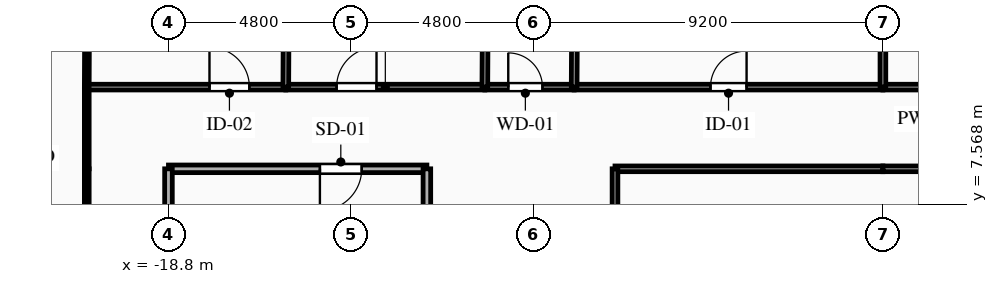
"""IFC4 building model, lengths in metres.
Left out: names, types, materials, properties, quantities, classifications, styles, units other than length and angle.
Written with IfcOpenShell. Run it as: python <this file> out.ifc"""

import sys

from ifc_helpers import new_model, si_unit, direction, frame, frame_2d, origin, place, context, subcontext, project, spatial, rectangle, extrude, element, fill, save


model = new_model("IFC4")
c1 = context("Model", 3, precision=1e-05, world=origin(), true_north=direction((0.0, 1.0)))
c2 = subcontext(c1, "Body", "Model", "MODEL_VIEW")
j1 = project(units=[si_unit("LENGTHUNIT", "METRE"), si_unit("PLANEANGLEUNIT", "RADIAN")], contexts=[c1])
p1 = place(None, origin())
s1 = spatial("IfcSite", under=j1, at=p1, CompositionType="ELEMENT")
p2 = place(p1, origin())
s2 = spatial("IfcBuilding", under=s1, at=p2, CompositionType="ELEMENT")
p3 = place(p2, frame((0.0, 0.0, 203.1)))
s3 = spatial("IfcBuildingStorey", under=s2, at=p3, CompositionType="ELEMENT", Elevation=203.1)
p4 = place(p3, frame((-12.0, 8.5, 0.0), z_axis=(0.0, 0.0, 1.0), x_axis=(-1.0, 0.0, 0.0)))
e1 = element("IfcWall", 1, at=p4, inside=s3, PredefinedType="PARTITIONING", context=c2, shape_type="SweptSolid", body=[
    extrude(rectangle(XDim=6.8, YDim=0.2, at=frame_2d((3.4, 0.0))), origin(), (0.0, 0.0, 1.0), 3.04),
])
p5 = place(p4, frame((1.715, 0.0, 0.0)))
e2 = element("IfcOpeningElement", 2, at=p5, cuts=e1, PredefinedType="OPENING", context=c2, shape_type="SweptSolid", body=[
    extrude(rectangle(XDim=1.1, YDim=2.15, at=frame_2d((0.55, 1.075))), frame((0.0, 0.11, 0.0), z_axis=(0.0, -1.0, 0.0), x_axis=(1.0, 0.0, 0.0)), (0.0, 0.0, 1.0), 0.22),
])
p6 = place(p3, frame((-18.8, 8.5, 0.0), z_axis=(0.0, 0.0, 1.0), x_axis=(0.0, -1.0, 0.0)))
e3 = element("IfcWall", 3, at=p6, inside=s3, PredefinedType="PARTITIONING", context=c2, shape_type="SweptSolid", body=[
    extrude(rectangle(XDim=2.9, YDim=0.2, at=frame_2d((1.45, 0.0))), origin(), (0.0, 0.0, 1.0), 2.665),
])
p7 = place(p3, frame((-12.0, 5.6, 0.0), z_axis=(0.0, 0.0, 1.0), x_axis=(0.0, 1.0, 0.0)))
e4 = element("IfcWall", 4, at=p7, inside=s3, PredefinedType="PARTITIONING", context=c2, shape_type="SweptSolid", body=[
    extrude(rectangle(XDim=2.9, YDim=0.2, at=frame_2d((1.45, 0.0))), origin(), (0.0, 0.0, 1.0), 3.04),
])
p8 = place(p3, frame((-20.95, 8.5, 0.0), z_axis=(0.0, 0.0, 1.0), x_axis=(0.0, 1.0, 0.0)))
e5 = element("IfcWall", 5, at=p8, inside=s3, PredefinedType="PARTITIONING", context=c2, shape_type="SweptSolid", body=[
    extrude(rectangle(XDim=2.15, YDim=0.125, at=frame_2d((1.075, 0.0))), origin(), (0.0, 0.0, 1.0), 3.04),
])
p9 = place(p3, frame((-20.95, 10.65, 0.0), z_axis=(0.0, 0.0, 1.0), x_axis=(1.0, 0.0, 0.0)))
e6 = element("IfcWall", 6, at=p9, inside=s3, PredefinedType="PARTITIONING", context=c2, shape_type="SweptSolid", body=[
    extrude(rectangle(XDim=5.238, YDim=0.15, at=frame_2d((2.619, 0.0))), origin(), (0.0, 0.0, 1.0), 3.04),
])
p10 = place(p9, frame((3.229, 0.0, 0.0)))
e7 = element("IfcOpeningElement", 7, at=p10, cuts=e6, PredefinedType="OPENING", context=c2, shape_type="SweptSolid", body=[
    extrude(rectangle(XDim=1.05, YDim=2.15, at=frame_2d((0.525, 1.075))), frame((0.0, 0.085, 0.0), z_axis=(0.0, -1.0, 0.0), x_axis=(1.0, 0.0, 0.0)), (0.0, 0.0, 1.0), 0.17),
])
p11 = place(p3, frame((-15.712, 10.65, 0.0), z_axis=(0.0, 0.0, 1.0), x_axis=(1.0, 0.0, 0.0)))
e8 = element("IfcWall", 8, at=p11, inside=s3, PredefinedType="PARTITIONING", context=c2, shape_type="SweptSolid", body=[
    extrude(rectangle(XDim=5.237, YDim=0.15, at=frame_2d((2.619, 0.0))), origin(), (0.0, 0.0, 1.0), 3.04),
])
p12 = place(p11, frame((1.337, 0.0, 0.0)))
e9 = element("IfcOpeningElement", 9, at=p12, cuts=e8, PredefinedType="OPENING", context=c2, shape_type="SweptSolid", body=[
    extrude(rectangle(XDim=1.05, YDim=2.15, at=frame_2d((0.525, 1.075))), frame((0.0, 0.085, 0.0), z_axis=(0.0, -1.0, 0.0), x_axis=(1.0, 0.0, 0.0)), (0.0, 0.0, 1.0), 0.17),
])
p13 = place(p3, frame((-10.475, 10.65, 0.0), z_axis=(0.0, 0.0, 1.0), x_axis=(1.0, 0.0, 0.0)))
e10 = element("IfcWall", 10, at=p13, inside=s3, PredefinedType="PLUMBINGWALL", context=c2, shape_type="SweptSolid", body=[
    extrude(rectangle(XDim=2.35, YDim=0.15, at=frame_2d((1.175, 0.0))), origin(), (0.0, 0.0, 1.0), 3.04),
])
p14 = place(p13, frame((0.616, 0.0, 0.0)))
e11 = element("IfcOpeningElement", 11, at=p14, cuts=e10, PredefinedType="OPENING", context=c2, shape_type="SweptSolid", body=[
    extrude(rectangle(XDim=0.9, YDim=2.1, at=frame_2d((0.45, 1.05))), frame((0.0, 0.085, 0.0), z_axis=(0.0, -1.0, 0.0), x_axis=(1.0, 0.0, 0.0)), (0.0, 0.0, 1.0), 0.17),
])
p15 = place(p3, frame((-8.125, 10.65, 0.0), z_axis=(0.0, 0.0, 1.0), x_axis=(1.0, 0.0, 0.0)))
e12 = element("IfcWall", 12, at=p15, inside=s3, PredefinedType="PARTITIONING", context=c2, shape_type="SweptSolid", body=[
    extrude(rectangle(XDim=8.125, YDim=0.15, at=frame_2d((4.062, 0.0))), origin(), (0.0, 0.0, 1.0), 3.04),
])
p16 = place(p15, frame((3.587, 0.0, 0.0)))
e13 = element("IfcOpeningElement", 13, at=p16, cuts=e12, PredefinedType="OPENING", context=c2, shape_type="SweptSolid", body=[
    extrude(rectangle(XDim=0.95, YDim=2.1, at=frame_2d((0.475, 1.05))), frame((0.0, 0.085, 0.0), z_axis=(0.0, -1.0, 0.0), x_axis=(1.0, 0.0, 0.0)), (0.0, 0.0, 1.0), 0.17),
])
p17 = place(p3, frame((0.0, 8.5, 0.0), z_axis=(0.0, 0.0, 1.0), x_axis=(-1.0, 0.0, 0.0)))
e14 = element("IfcWall", 14, at=p17, inside=s3, PredefinedType="PARTITIONING", context=c2, shape_type="SweptSolid", body=[
    extrude(rectangle(XDim=7.05, YDim=0.15, at=frame_2d((3.525, 0.0))), origin(), (0.0, 0.0, 1.0), 3.04),
])
p18 = place(p3, frame((0.0, 10.65, 0.0), z_axis=(0.0, 0.0, 1.0), x_axis=(1.0, 0.0, 0.0)))
e15 = element("IfcWall", 15, at=p18, inside=s3, PredefinedType="PLUMBINGWALL", context=c2, shape_type="SweptSolid", body=[
    extrude(rectangle(XDim=2.45, YDim=0.15, at=frame_2d((1.225, 0.0))), origin(), (0.0, 0.0, 1.0), 3.04),
])
p19 = place(p3, frame((7.05, 8.5, 0.0), z_axis=(0.0, 0.0, 1.0), x_axis=(-1.0, 0.0, 0.0)))
e16 = element("IfcWall", 16, at=p19, inside=s3, PredefinedType="PARTITIONING", context=c2, shape_type="SweptSolid", body=[
    extrude(rectangle(XDim=7.05, YDim=0.15, at=frame_2d((3.525, 0.0))), origin(), (0.0, 0.0, 1.0), 3.04),
])
p20 = place(p3, frame((-20.95, 2.267, 0.0), z_axis=(0.0, 0.0, 1.0), x_axis=(0.0, 1.0, 0.0)))
e17 = element("IfcWall", 17, at=p20, inside=s3, PredefinedType="PARTITIONING", context=c2, shape_type="SweptSolid", body=[
    extrude(rectangle(XDim=6.233, YDim=0.125, at=frame_2d((3.116, 0.0))), origin(), (0.0, 0.0, 1.0), 3.04),
])
p21 = place(p20, frame((1.095, 0.0, 0.0)))
e18 = element("IfcOpeningElement", 18, at=p21, cuts=e17, PredefinedType="OPENING", context=c2, shape_type="SweptSolid", body=[
    extrude(rectangle(XDim=0.95, YDim=2.1, at=frame_2d((0.475, 1.05))), frame((0.0, 0.073, 0.0), z_axis=(0.0, -1.0, 0.0), x_axis=(1.0, 0.0, 0.0)), (0.0, 0.0, 1.0), 0.145),
])
p22 = place(p3, frame((-7.05, 8.5, 0.0), z_axis=(0.0, 0.0, 1.0), x_axis=(0.0, -1.0, 0.0)))
e19 = element("IfcWall", 19, at=p22, inside=s3, PredefinedType="PARTITIONING", context=c2, shape_type="SweptSolid", body=[
    extrude(rectangle(XDim=9.3, YDim=0.15, at=frame_2d((4.65, 0.0))), origin(), (0.0, 0.0, 1.0), 3.04),
])
p23 = place(p3, frame((-20.906, 19.662, 0.0), z_axis=(0.0, 0.0, 1.0), x_axis=(-0.004876272857, -0.999988110911, 0.0)))
e20 = element("IfcWall", 20, at=p23, inside=s3, PredefinedType="PARTITIONING", context=c2, shape_type="SweptSolid", body=[
    extrude(rectangle(XDim=9.012, YDim=0.125, at=frame_2d((4.506, 0.0))), origin(), (0.0, 0.0, 1.0), 2.665),
])
p24 = place(p3, frame((-15.669, 19.112, 0.0), z_axis=(0.0, 0.0, 1.0), x_axis=(-0.005164534834, -0.999986663701, 0.0)))
e21 = element("IfcWall", 21, at=p24, inside=s3, PredefinedType="PARTITIONING", context=c2, shape_type="SweptSolid", body=[
    extrude(rectangle(XDim=8.462, YDim=0.15, at=frame_2d((4.231, 0.0))), origin(), (0.0, 0.0, 1.0), 2.665),
])
p25 = place(p3, frame((-10.431, 18.561, 0.0), z_axis=(0.0, 0.0, 1.0), x_axis=(-0.005554784069, -0.999984572068, 0.0)))
e22 = element("IfcWall", 22, at=p25, inside=s3, PredefinedType="PLUMBINGWALL", context=c2, shape_type="SweptSolid", body=[
    extrude(rectangle(XDim=7.911, YDim=0.15, at=frame_2d((3.956, 0.0))), origin(), (0.0, 0.0, 1.0), 3.04),
])
p26 = place(p3, frame((-8.081, 18.314, 0.0), z_axis=(0.0, 0.0, 1.0), x_axis=(-0.005733850696, -0.999983561343, 0.0)))
e23 = element("IfcWall", 23, at=p26, inside=s3, PredefinedType="PLUMBINGWALL", context=c2, shape_type="SweptSolid", body=[
    extrude(rectangle(XDim=7.664, YDim=0.15, at=frame_2d((3.832, 0.0))), origin(), (0.0, 0.0, 1.0), 2.665),
])
p27 = place(p3, frame((0.0, 12.8, 0.0), z_axis=(0.0, 0.0, 1.0), x_axis=(0.0, -1.0, 0.0)))
e24 = element("IfcWall", 24, at=p27, inside=s3, PredefinedType="PLUMBINGWALL", context=c2, shape_type="SweptSolid", body=[
    extrude(rectangle(XDim=2.15, YDim=0.15, at=frame_2d((1.075, 0.0))), origin(), (0.0, 0.0, 1.0), 3.04),
])
p28 = place(p5, origin())
e25 = element("IfcDoor", 25, at=p28, inside=s3, OperationType="SINGLE_SWING_RIGHT", PredefinedType="DOOR", context=c2, shape_type="SweptSolid", body=[
    extrude(rectangle(XDim=1.1, YDim=2.15, at=frame_2d((0.55, 1.075))), frame((0.0, 0.025, 0.0), z_axis=(0.0, -1.0, 0.0), x_axis=(1.0, 0.0, 0.0)), (0.0, 0.0, 1.0), 0.05),
])
fill(e2, e25)
p29 = place(p10, origin())
e26 = element("IfcDoor", 26, at=p29, inside=s3, OperationType="SINGLE_SWING_LEFT", PredefinedType="DOOR", context=c2, shape_type="SweptSolid", body=[
    extrude(rectangle(XDim=1.05, YDim=2.15, at=frame_2d((0.525, 1.075))), frame((0.0, 0.025, 0.0), z_axis=(0.0, -1.0, 0.0), x_axis=(1.0, 0.0, 0.0)), (0.0, 0.0, 1.0), 0.05),
])
fill(e7, e26)
p30 = place(p12, origin())
e27 = element("IfcDoor", 27, at=p30, inside=s3, OperationType="SINGLE_SWING_RIGHT", PredefinedType="DOOR", context=c2, shape_type="SweptSolid", body=[
    extrude(rectangle(XDim=1.05, YDim=2.15, at=frame_2d((0.525, 1.075))), frame((0.0, 0.025, 0.0), z_axis=(0.0, -1.0, 0.0), x_axis=(1.0, 0.0, 0.0)), (0.0, 0.0, 1.0), 0.05),
])
fill(e9, e27)
p31 = place(p14, origin())
e28 = element("IfcDoor", 28, at=p31, inside=s3, OperationType="SINGLE_SWING_LEFT", PredefinedType="DOOR", context=c2, shape_type="SweptSolid", body=[
    extrude(rectangle(XDim=0.9, YDim=2.1, at=frame_2d((0.45, 1.05))), frame((0.0, 0.025, 0.0), z_axis=(0.0, -1.0, 0.0), x_axis=(1.0, 0.0, 0.0)), (0.0, 0.0, 1.0), 0.05),
])
fill(e11, e28)
p32 = place(p16, origin())
e29 = element("IfcDoor", 29, at=p32, inside=s3, OperationType="SINGLE_SWING_RIGHT", PredefinedType="DOOR", context=c2, shape_type="SweptSolid", body=[
    extrude(rectangle(XDim=0.95, YDim=2.1, at=frame_2d((0.475, 1.05))), frame((0.0, 0.025, 0.0), z_axis=(0.0, -1.0, 0.0), x_axis=(1.0, 0.0, 0.0)), (0.0, 0.0, 1.0), 0.05),
])
fill(e13, e29)
save(model, sys.argv[1])
